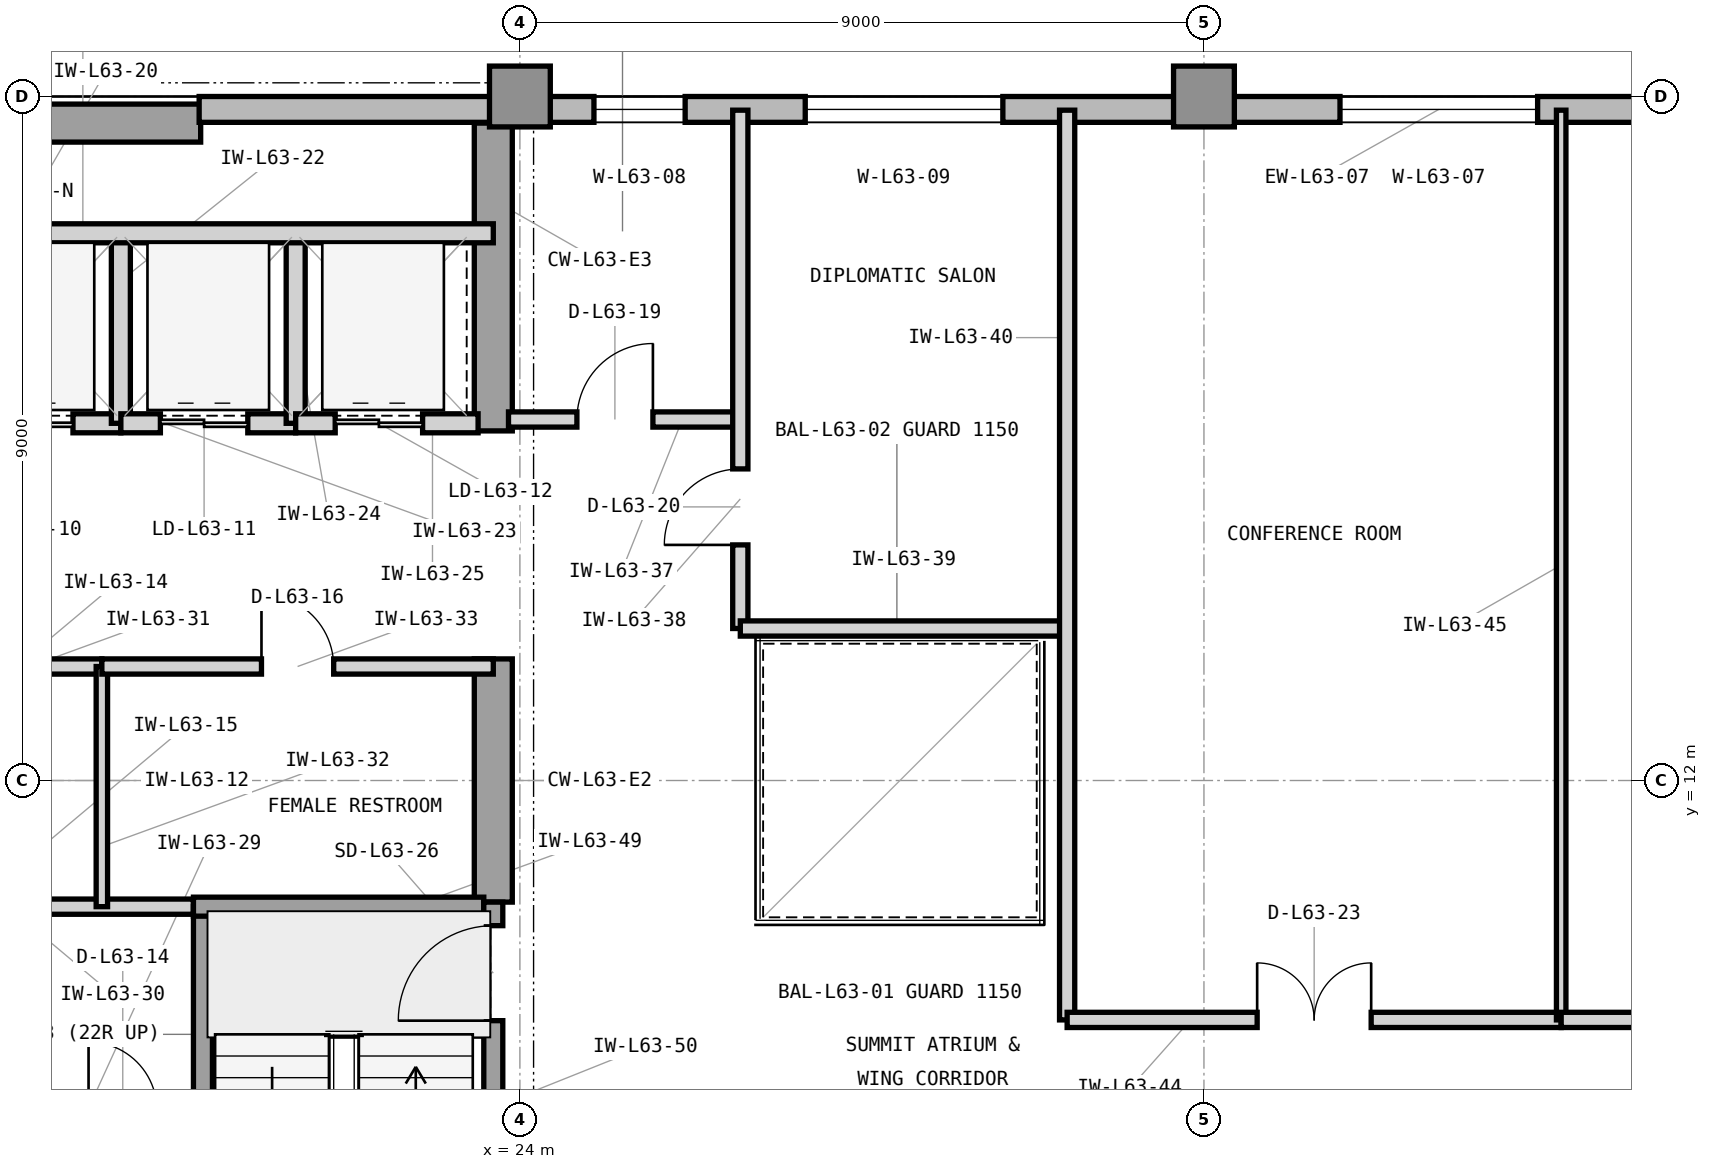
"""IFC4 building model, lengths in metres.
Left out: names, types, materials, properties, quantities, classifications, styles, units other than length and angle.
Written with IfcOpenShell. Run it as: python <this file> out.ifc"""

import sys

from ifc_helpers import new_model, si_unit, direction, frame, frame_2d, origin, origin_2d, place, context, subcontext, project, spatial, rectangle, extrude, element, fill, save


model = new_model("IFC4")
c1 = context("Model", 3, precision=1e-05, world=origin(), true_north=direction((0.0, 1.0)))
c2 = subcontext(c1, "Body", "Model", "MODEL_VIEW")
j1 = project(units=[si_unit("LENGTHUNIT", "METRE"), si_unit("PLANEANGLEUNIT", "RADIAN")], contexts=[c1])
p1 = place(None, origin())
s1 = spatial("IfcSite", under=j1, at=p1, CompositionType="ELEMENT")
p2 = place(p1, origin())
s2 = spatial("IfcBuilding", under=s1, at=p2, CompositionType="ELEMENT")
p3 = place(p2, frame((0.0, 0.0, 258.6)))
s3 = spatial("IfcBuildingStorey", under=s2, at=p3, CompositionType="ELEMENT", Elevation=258.6)
p4 = place(p3, frame((7.475, 20.65, 0.0), z_axis=(0.0, 0.0, 1.0), x_axis=(1.0, 0.0, 0.0)))
e1 = element("IfcWall", 1, at=p4, inside=s3, PredefinedType="SHEAR", context=c2, shape_type="SweptSolid", body=[
    extrude(rectangle(XDim=12.325, YDim=0.5, at=frame_2d((6.163, 0.0))), origin(), (0.0, 0.0, 1.0), 3.9),
])
p5 = place(p3, frame((23.65, 10.4, 0.0), z_axis=(0.0, 0.0, 1.0), x_axis=(0.0, 1.0, 0.0)))
e2 = element("IfcWall", 2, at=p5, inside=s3, PredefinedType="SHEAR", context=c2, shape_type="SweptSolid", body=[
    extrude(rectangle(XDim=3.2, YDim=0.5, at=frame_2d((1.6, 0.0))), origin(), (0.0, 0.0, 1.0), 3.9),
])
p6 = place(p3, frame((23.65, 16.6, 0.0), z_axis=(0.0, 0.0, 1.0), x_axis=(0.0, 1.0, 0.0)))
e3 = element("IfcWall", 3, at=p6, inside=s3, PredefinedType="SHEAR", context=c2, shape_type="SweptSolid", body=[
    extrude(rectangle(XDim=4.05, YDim=0.5, at=frame_2d((2.025, 0.0))), origin(), (0.0, 0.0, 1.0), 3.9),
])
for number, where, z_axis, x_axis in (
    (4, (24.0, 21.0, 0.0), (0.0, 0.0, 1.0), (1.0, 0.0, 0.0)),
    (5, (33.0, 21.0, 0.0), (0.0, 0.0, 1.0), (1.0, 0.0, 0.0)),
):
    element("IfcColumn", number, at=place(p3, frame(where, z_axis=z_axis, x_axis=x_axis)), inside=s3, PredefinedType="COLUMN", context=c2, shape_type="SweptSolid", body=[
        extrude(rectangle(XDim=0.8, YDim=0.8, at=origin_2d()), origin(), (0.0, 0.0, 1.0), 3.9),
    ])
p7 = place(p3, frame((52.4, 20.83, 0.0), z_axis=(0.0, 0.0, 1.0), x_axis=(-1.0, 0.0, 0.0)))
e6 = element("IfcWall", 6, at=p7, inside=s3, PredefinedType="STANDARD", context=c2, shape_type="SweptSolid", body=[
    extrude(rectangle(XDim=32.62, YDim=0.34, at=frame_2d((16.31, 0.0))), origin(), (0.0, 0.0, 1.0), 3.715),
])
p8 = place(p7, frame((5.69, 0.0, 0.8)))
e7 = element("IfcOpeningElement", 7, at=p8, cuts=e6, PredefinedType="OPENING", context=c2, shape_type="SweptSolid", body=[
    extrude(rectangle(XDim=2.6, YDim=2.35, at=frame_2d((1.3, 1.175))), frame((0.0, 0.18, 0.0), z_axis=(0.0, -1.0, 0.0), x_axis=(1.0, 0.0, 0.0)), (0.0, 0.0, 1.0), 0.36),
])
p9 = place(p7, frame((15.01, 0.0, 0.8)))
e8 = element("IfcOpeningElement", 8, at=p9, cuts=e6, PredefinedType="OPENING", context=c2, shape_type="SweptSolid", body=[
    extrude(rectangle(XDim=2.6, YDim=2.35, at=frame_2d((1.3, 1.175))), frame((0.0, 0.18, 0.0), z_axis=(0.0, -1.0, 0.0), x_axis=(1.0, 0.0, 0.0)), (0.0, 0.0, 1.0), 0.36),
])
p10 = place(p7, frame((26.226, 0.0, 0.8)))
e9 = element("IfcOpeningElement", 9, at=p10, cuts=e6, PredefinedType="OPENING", context=c2, shape_type="SweptSolid", body=[
    extrude(rectangle(XDim=1.2, YDim=2.35, at=frame_2d((0.6, 1.175))), frame((0.0, 0.18, 0.0), z_axis=(0.0, -1.0, 0.0), x_axis=(1.0, 0.0, 0.0)), (0.0, 0.0, 1.0), 0.36),
])
p11 = place(p7, frame((22.046, 0.0, 0.8)))
e10 = element("IfcOpeningElement", 10, at=p11, cuts=e6, PredefinedType="OPENING", context=c2, shape_type="SweptSolid", body=[
    extrude(rectangle(XDim=2.6, YDim=2.35, at=frame_2d((1.3, 1.175))), frame((0.0, 0.18, 0.0), z_axis=(0.0, -1.0, 0.0), x_axis=(1.0, 0.0, 0.0)), (0.0, 0.0, 1.0), 0.36),
])
p12 = place(p3, frame((16.45, 16.7, 0.0), z_axis=(0.0, 0.0, 1.0), x_axis=(1.0, 0.0, 0.0)))
e11 = element("IfcWall", 11, at=p12, inside=s3, PredefinedType="PARTITIONING", context=c2, shape_type="SweptSolid", body=[
    extrude(rectangle(XDim=2.3, YDim=0.25, at=frame_2d((1.15, 0.0))), origin(), (0.0, 0.0, 1.0), 3.088),
])
p13 = place(p12, frame((0.52, 0.0, 0.0)))
e12 = element("IfcOpeningElement", 12, at=p13, cuts=e11, PredefinedType="OPENING", context=c2, shape_type="SweptSolid", body=[
    extrude(rectangle(XDim=1.15, YDim=2.25, at=frame_2d((0.575, 1.125))), frame((0.0, 0.135, 0.0), z_axis=(0.0, -1.0, 0.0), x_axis=(1.0, 0.0, 0.0)), (0.0, 0.0, 1.0), 0.27),
])
p14 = place(p3, frame((18.75, 16.7, 0.0), z_axis=(0.0, 0.0, 1.0), x_axis=(0.0, 1.0, 0.0)))
e13 = element("IfcWall", 13, at=p14, inside=s3, PredefinedType="PARTITIONING", context=c2, shape_type="SweptSolid", body=[
    extrude(rectangle(XDim=2.5, YDim=0.25, at=frame_2d((1.25, 0.0))), origin(), (0.0, 0.0, 1.0), 3.705),
])
p15 = place(p3, frame((18.75, 16.7, 0.0), z_axis=(0.0, 0.0, 1.0), x_axis=(1.0, 0.0, 0.0)))
e14 = element("IfcWall", 14, at=p15, inside=s3, PredefinedType="PARTITIONING", context=c2, shape_type="SweptSolid", body=[
    extrude(rectangle(XDim=2.3, YDim=0.25, at=frame_2d((1.15, 0.0))), origin(), (0.0, 0.0, 1.0), 3.088),
])
p16 = place(p15, frame((0.52, 0.0, 0.0)))
e15 = element("IfcOpeningElement", 15, at=p16, cuts=e14, PredefinedType="OPENING", context=c2, shape_type="SweptSolid", body=[
    extrude(rectangle(XDim=1.15, YDim=2.25, at=frame_2d((0.575, 1.125))), frame((0.0, 0.135, 0.0), z_axis=(0.0, -1.0, 0.0), x_axis=(1.0, 0.0, 0.0)), (0.0, 0.0, 1.0), 0.27),
])
p17 = place(p3, frame((21.05, 16.7, 0.0), z_axis=(0.0, 0.0, 1.0), x_axis=(0.0, 1.0, 0.0)))
e16 = element("IfcWall", 16, at=p17, inside=s3, PredefinedType="PARTITIONING", context=c2, shape_type="SweptSolid", body=[
    extrude(rectangle(XDim=2.5, YDim=0.25, at=frame_2d((1.25, 0.0))), origin(), (0.0, 0.0, 1.0), 3.705),
])
p18 = place(p3, frame((21.05, 16.7, 0.0), z_axis=(0.0, 0.0, 1.0), x_axis=(1.0, 0.0, 0.0)))
e17 = element("IfcWall", 17, at=p18, inside=s3, PredefinedType="PARTITIONING", context=c2, shape_type="SweptSolid", body=[
    extrude(rectangle(XDim=2.4, YDim=0.25, at=frame_2d((1.2, 0.0))), origin(), (0.0, 0.0, 1.0), 3.088),
])
p19 = place(p18, frame((0.52, 0.0, 0.0)))
e18 = element("IfcOpeningElement", 18, at=p19, cuts=e17, PredefinedType="OPENING", context=c2, shape_type="SweptSolid", body=[
    extrude(rectangle(XDim=1.15, YDim=2.25, at=frame_2d((0.575, 1.125))), frame((0.0, 0.135, 0.0), z_axis=(0.0, -1.0, 0.0), x_axis=(1.0, 0.0, 0.0)), (0.0, 0.0, 1.0), 0.27),
])
p20 = place(p3, frame((16.45, 19.2, 0.0), z_axis=(0.0, 0.0, 1.0), x_axis=(1.0, 0.0, 0.0)))
e19 = element("IfcWall", 19, at=p20, inside=s3, PredefinedType="PARTITIONING", context=c2, shape_type="SweptSolid", body=[
    extrude(rectangle(XDim=7.2, YDim=0.25, at=frame_2d((3.6, 0.0))), origin(), (0.0, 0.0, 1.0), 3.705),
])
p21 = place(p3, frame((14.825, 10.34, 0.0), z_axis=(0.0, 0.0, 1.0), x_axis=(1.0, 0.0, 0.0)))
e20 = element("IfcWall", 20, at=p21, inside=s3, PredefinedType="PARTITIONING", context=c2, shape_type="SweptSolid", body=[
    extrude(rectangle(XDim=4.88, YDim=0.2, at=frame_2d((2.44, 0.0))), origin(), (0.0, 0.0, 1.0), 3.088),
])
p22 = place(p3, frame((14.7, 13.5, 0.0), z_axis=(0.0, 0.0, 1.0), x_axis=(1.0, 0.0, 0.0)))
e21 = element("IfcWall", 21, at=p22, inside=s3, PredefinedType="PARTITIONING", context=c2, shape_type="SweptSolid", body=[
    extrude(rectangle(XDim=3.8, YDim=0.2, at=frame_2d((1.9, 0.0))), origin(), (0.0, 0.0, 1.0), 3.088),
])
p23 = place(p22, frame((1.425, 0.0, 0.0)))
e22 = element("IfcOpeningElement", 22, at=p23, cuts=e21, PredefinedType="OPENING", context=c2, shape_type="SweptSolid", body=[
    extrude(rectangle(XDim=0.95, YDim=2.1, at=frame_2d((0.475, 1.05))), frame((0.0, 0.11, 0.0), z_axis=(0.0, -1.0, 0.0), x_axis=(1.0, 0.0, 0.0)), (0.0, 0.0, 1.0), 0.22),
])
p24 = place(p3, frame((18.5, 10.34, 0.0), z_axis=(0.0, 0.0, 1.0), x_axis=(0.0, 1.0, 0.0)))
e23 = element("IfcWall", 23, at=p24, inside=s3, PredefinedType="PARTITIONING", context=c2, shape_type="SweptSolid", body=[
    extrude(rectangle(XDim=3.16, YDim=0.15, at=frame_2d((1.58, 0.0))), origin(), (0.0, 0.0, 1.0), 3.705),
])
p25 = place(p3, frame((18.5, 13.5, 0.0), z_axis=(0.0, 0.0, 1.0), x_axis=(1.0, 0.0, 0.0)))
e24 = element("IfcWall", 24, at=p25, inside=s3, PredefinedType="PARTITIONING", context=c2, shape_type="SweptSolid", body=[
    extrude(rectangle(XDim=5.15, YDim=0.2, at=frame_2d((2.575, 0.0))), origin(), (0.0, 0.0, 1.0), 3.088),
])
p26 = place(p25, frame((2.1, 0.0, 0.0)))
e25 = element("IfcOpeningElement", 25, at=p26, cuts=e24, PredefinedType="OPENING", context=c2, shape_type="SweptSolid", body=[
    extrude(rectangle(XDim=0.95, YDim=2.1, at=frame_2d((0.475, 1.05))), frame((0.0, 0.11, 0.0), z_axis=(0.0, -1.0, 0.0), x_axis=(1.0, 0.0, 0.0)), (0.0, 0.0, 1.0), 0.22),
])
p27 = place(p3, frame((23.85, 16.75, 0.0), z_axis=(0.0, 0.0, 1.0), x_axis=(1.0, 0.0, 0.0)))
e26 = element("IfcWall", 26, at=p27, inside=s3, PredefinedType="PARTITIONING", context=c2, shape_type="SweptSolid", body=[
    extrude(rectangle(XDim=3.05, YDim=0.2, at=frame_2d((1.525, 0.0))), origin(), (0.0, 0.0, 1.0), 3.705),
])
p28 = place(p27, frame((0.9, 0.0, 0.0)))
e27 = element("IfcOpeningElement", 27, at=p28, cuts=e26, PredefinedType="OPENING", context=c2, shape_type="SweptSolid", body=[
    extrude(rectangle(XDim=1.0, YDim=2.15, at=frame_2d((0.5, 1.075))), frame((0.0, 0.11, 0.0), z_axis=(0.0, -1.0, 0.0), x_axis=(1.0, 0.0, 0.0)), (0.0, 0.0, 1.0), 0.22),
])
p29 = place(p3, frame((26.9, 14.0, 0.0), z_axis=(0.0, 0.0, 1.0), x_axis=(0.0, 1.0, 0.0)))
e28 = element("IfcWall", 28, at=p29, inside=s3, PredefinedType="PARTITIONING", context=c2, shape_type="SweptSolid", body=[
    extrude(rectangle(XDim=6.82, YDim=0.2, at=frame_2d((3.41, 0.0))), origin(), (0.0, 0.0, 1.0), 3.705),
])
p30 = place(p29, frame((1.1, 0.0, 0.0)))
e29 = element("IfcOpeningElement", 29, at=p30, cuts=e28, PredefinedType="OPENING", context=c2, shape_type="SweptSolid", body=[
    extrude(rectangle(XDim=1.0, YDim=2.15, at=frame_2d((0.5, 1.075))), frame((0.0, 0.11, 0.0), z_axis=(0.0, -1.0, 0.0), x_axis=(1.0, 0.0, 0.0)), (0.0, 0.0, 1.0), 0.22),
])
p31 = place(p3, frame((26.9, 14.0, 0.0), z_axis=(0.0, 0.0, 1.0), x_axis=(1.0, 0.0, 0.0)))
e30 = element("IfcWall", 30, at=p31, inside=s3, PredefinedType="PARTITIONING", context=c2, shape_type="SweptSolid", body=[
    extrude(rectangle(XDim=4.3, YDim=0.2, at=frame_2d((2.15, 0.0))), origin(), (0.0, 0.0, 1.0), 3.705),
])
p32 = place(p3, frame((31.2, 8.85, 0.0), z_axis=(0.0, 0.0, 1.0), x_axis=(0.0, 1.0, 0.0)))
e31 = element("IfcWall", 31, at=p32, inside=s3, PredefinedType="PARTITIONING", context=c2, shape_type="SweptSolid", body=[
    extrude(rectangle(XDim=11.97, YDim=0.2, at=frame_2d((5.985, 0.0))), origin(), (0.0, 0.0, 1.0), 3.705),
])
p33 = place(p3, frame((31.2, 8.85, 0.0), z_axis=(0.0, 0.0, 1.0), x_axis=(1.0, 0.0, 0.0)))
e32 = element("IfcWall", 32, at=p33, inside=s3, PredefinedType="PARTITIONING", context=c2, shape_type="SweptSolid", body=[
    extrude(rectangle(XDim=6.5, YDim=0.2, at=frame_2d((3.25, 0.0))), origin(), (0.0, 0.0, 1.0), 3.705),
])
p34 = place(p33, frame((2.5, 0.0, 0.0)))
e33 = element("IfcOpeningElement", 33, at=p34, cuts=e32, PredefinedType="OPENING", context=c2, shape_type="SweptSolid", body=[
    extrude(rectangle(XDim=1.5, YDim=2.3, at=frame_2d((0.75, 1.15))), frame((0.0, 0.11, 0.0), z_axis=(0.0, -1.0, 0.0), x_axis=(1.0, 0.0, 0.0)), (0.0, 0.0, 1.0), 0.22),
])
p35 = place(p3, frame((37.7, 8.85, 0.0), z_axis=(0.0, 0.0, 1.0), x_axis=(0.0, 1.0, 0.0)))
e34 = element("IfcWall", 34, at=p35, inside=s3, PredefinedType="PARTITIONING", context=c2, shape_type="SweptSolid", body=[
    extrude(rectangle(XDim=11.97, YDim=0.125, at=frame_2d((5.985, 0.0))), origin(), (0.0, 0.0, 1.0), 3.705),
])
p36 = place(p3, frame((37.7, 8.85, 0.0), z_axis=(0.0, 0.0, 1.0), x_axis=(1.0, 0.0, 0.0)))
e35 = element("IfcWall", 35, at=p36, inside=s3, PredefinedType="PARTITIONING", context=c2, shape_type="SweptSolid", body=[
    extrude(rectangle(XDim=9.3, YDim=0.2, at=frame_2d((4.65, 0.0))), origin(), (0.0, 0.0, 1.0), 3.705),
])
p37 = place(p36, frame((4.15, 0.0, 0.0)))
e36 = element("IfcOpeningElement", 36, at=p37, cuts=e35, PredefinedType="OPENING", context=c2, shape_type="SweptSolid", body=[
    extrude(rectangle(XDim=1.0, YDim=2.15, at=frame_2d((0.5, 1.075))), frame((0.0, 0.11, 0.0), z_axis=(0.0, -1.0, 0.0), x_axis=(1.0, 0.0, 0.0)), (0.0, 0.0, 1.0), 0.22),
])
p38 = place(p3, frame((19.83, 3.6, 0.0), z_axis=(0.0, 0.0, 1.0), x_axis=(0.0, 1.0, 0.0)))
e37 = element("IfcWall", 37, at=p38, inside=s3, PredefinedType="SHEAR", context=c2, shape_type="SweptSolid", body=[
    extrude(rectangle(XDim=6.74, YDim=0.25, at=frame_2d((3.37, 0.0))), origin(), (0.0, 0.0, 1.0), 3.9),
])
p39 = place(p3, frame((19.705, 10.34, 0.0), z_axis=(0.0, 0.0, 1.0), x_axis=(1.0, 0.0, 0.0)))
e38 = element("IfcWall", 38, at=p39, inside=s3, PredefinedType="SHEAR", context=c2, shape_type="SweptSolid", body=[
    extrude(rectangle(XDim=3.82, YDim=0.25, at=frame_2d((1.91, 0.0))), origin(), (0.0, 0.0, 1.0), 3.9),
])
p40 = place(p3, frame((23.65, 6.8, 0.0), z_axis=(0.0, 0.0, 1.0), x_axis=(0.0, 1.0, 0.0)))
e39 = element("IfcWall", 39, at=p40, inside=s3, PredefinedType="SHEAR", context=c2, shape_type="SweptSolid", body=[
    extrude(rectangle(XDim=3.6, YDim=0.25, at=frame_2d((1.8, 0.0))), origin(), (0.0, 0.0, 1.0), 3.9),
])
p41 = place(p40, frame((2.04, 0.0, 0.0)))
e40 = element("IfcOpeningElement", 40, at=p41, cuts=e39, PredefinedType="OPENING", context=c2, shape_type="SweptSolid", body=[
    extrude(rectangle(XDim=1.25, YDim=2.2, at=frame_2d((0.625, 1.1))), frame((0.0, 0.135, 0.0), z_axis=(0.0, -1.0, 0.0), x_axis=(1.0, 0.0, 0.0)), (0.0, 0.0, 1.0), 0.27),
])
p42 = place(p9, origin())
e41 = element("IfcWindow", 41, at=p42, inside=s3, PartitioningType="SINGLE_PANEL", PredefinedType="WINDOW", context=c2, shape_type="SweptSolid", body=[
    extrude(rectangle(XDim=2.6, YDim=2.35, at=frame_2d((1.3, 1.175))), frame((0.0, 0.11, 0.0), z_axis=(0.0, -1.0, 0.0), x_axis=(1.0, 0.0, 0.0)), (0.0, 0.0, 1.0), 0.06),
])
fill(e8, e41)
p43 = place(p13, origin())
e42 = element("IfcDoor", 42, at=p43, inside=s3, OperationType="DOUBLE_DOOR_SLIDING", PredefinedType="DOOR", context=c2, shape_type="SweptSolid", body=[
    extrude(rectangle(XDim=1.15, YDim=2.25, at=frame_2d((0.575, 1.125))), frame((0.0, 0.025, 0.0), z_axis=(0.0, -1.0, 0.0), x_axis=(1.0, 0.0, 0.0)), (0.0, 0.0, 1.0), 0.05),
])
fill(e12, e42)
p44 = place(p16, origin())
e43 = element("IfcDoor", 43, at=p44, inside=s3, OperationType="DOUBLE_DOOR_SLIDING", PredefinedType="DOOR", context=c2, shape_type="SweptSolid", body=[
    extrude(rectangle(XDim=1.15, YDim=2.25, at=frame_2d((0.575, 1.125))), frame((0.0, 0.025, 0.0), z_axis=(0.0, -1.0, 0.0), x_axis=(1.0, 0.0, 0.0)), (0.0, 0.0, 1.0), 0.05),
])
fill(e15, e43)
p45 = place(p19, origin())
e44 = element("IfcDoor", 44, at=p45, inside=s3, OperationType="DOUBLE_DOOR_SLIDING", PredefinedType="DOOR", context=c2, shape_type="SweptSolid", body=[
    extrude(rectangle(XDim=1.15, YDim=2.25, at=frame_2d((0.575, 1.125))), frame((0.0, 0.025, 0.0), z_axis=(0.0, -1.0, 0.0), x_axis=(1.0, 0.0, 0.0)), (0.0, 0.0, 1.0), 0.05),
])
fill(e18, e44)
p46 = place(p26, origin())
e45 = element("IfcDoor", 45, at=p46, inside=s3, OperationType="SINGLE_SWING_LEFT", PredefinedType="DOOR", context=c2, shape_type="SweptSolid", body=[
    extrude(rectangle(XDim=0.95, YDim=2.1, at=frame_2d((0.475, 1.05))), frame((0.0, 0.025, 0.0), z_axis=(0.0, -1.0, 0.0), x_axis=(1.0, 0.0, 0.0)), (0.0, 0.0, 1.0), 0.05),
])
fill(e25, e45)
p47 = place(p28, origin())
e46 = element("IfcDoor", 46, at=p47, inside=s3, OperationType="SINGLE_SWING_RIGHT", PredefinedType="DOOR", context=c2, shape_type="SweptSolid", body=[
    extrude(rectangle(XDim=1.0, YDim=2.15, at=frame_2d((0.5, 1.075))), frame((0.0, 0.025, 0.0), z_axis=(0.0, -1.0, 0.0), x_axis=(1.0, 0.0, 0.0)), (0.0, 0.0, 1.0), 0.05),
])
fill(e27, e46)
p48 = place(p30, origin())
e47 = element("IfcDoor", 47, at=p48, inside=s3, OperationType="SINGLE_SWING_LEFT", PredefinedType="DOOR", context=c2, shape_type="SweptSolid", body=[
    extrude(rectangle(XDim=1.0, YDim=2.15, at=frame_2d((0.5, 1.075))), frame((0.0, 0.025, 0.0), z_axis=(0.0, -1.0, 0.0), x_axis=(1.0, 0.0, 0.0)), (0.0, 0.0, 1.0), 0.05),
])
fill(e29, e47)
p49 = place(p34, origin())
e48 = element("IfcDoor", 48, at=p49, inside=s3, OperationType="DOUBLE_DOOR_SINGLE_SWING", PredefinedType="DOOR", context=c2, shape_type="SweptSolid", body=[
    extrude(rectangle(XDim=1.5, YDim=2.3, at=frame_2d((0.75, 1.15))), frame((0.0, 0.025, 0.0), z_axis=(0.0, -1.0, 0.0), x_axis=(1.0, 0.0, 0.0)), (0.0, 0.0, 1.0), 0.05),
])
fill(e33, e48)
p50 = place(p41, origin())
e49 = element("IfcDoor", 49, at=p50, inside=s3, OperationType="SINGLE_SWING_LEFT", PredefinedType="DOOR", context=c2, shape_type="SweptSolid", body=[
    extrude(rectangle(XDim=1.25, YDim=2.2, at=frame_2d((0.625, 1.1))), frame((0.0, 0.025, 0.0), z_axis=(0.0, -1.0, 0.0), x_axis=(1.0, 0.0, 0.0)), (0.0, 0.0, 1.0), 0.05),
])
fill(e40, e49)
p51 = place(p10, origin())
e50 = element("IfcWindow", 50, at=p51, inside=s3, PartitioningType="SINGLE_PANEL", PredefinedType="WINDOW", context=c2, shape_type="SweptSolid", body=[
    extrude(rectangle(XDim=1.2, YDim=2.35, at=frame_2d((0.6, 1.175))), frame((0.0, 0.11, 0.0), z_axis=(0.0, -1.0, 0.0), x_axis=(1.0, 0.0, 0.0)), (0.0, 0.0, 1.0), 0.06),
])
fill(e9, e50)
p52 = place(p11, origin())
e51 = element("IfcWindow", 51, at=p52, inside=s3, PartitioningType="SINGLE_PANEL", PredefinedType="WINDOW", context=c2, shape_type="SweptSolid", body=[
    extrude(rectangle(XDim=2.6, YDim=2.35, at=frame_2d((1.3, 1.175))), frame((0.0, 0.11, 0.0), z_axis=(0.0, -1.0, 0.0), x_axis=(1.0, 0.0, 0.0)), (0.0, 0.0, 1.0), 0.06),
])
fill(e10, e51)
save(model, sys.argv[1])
